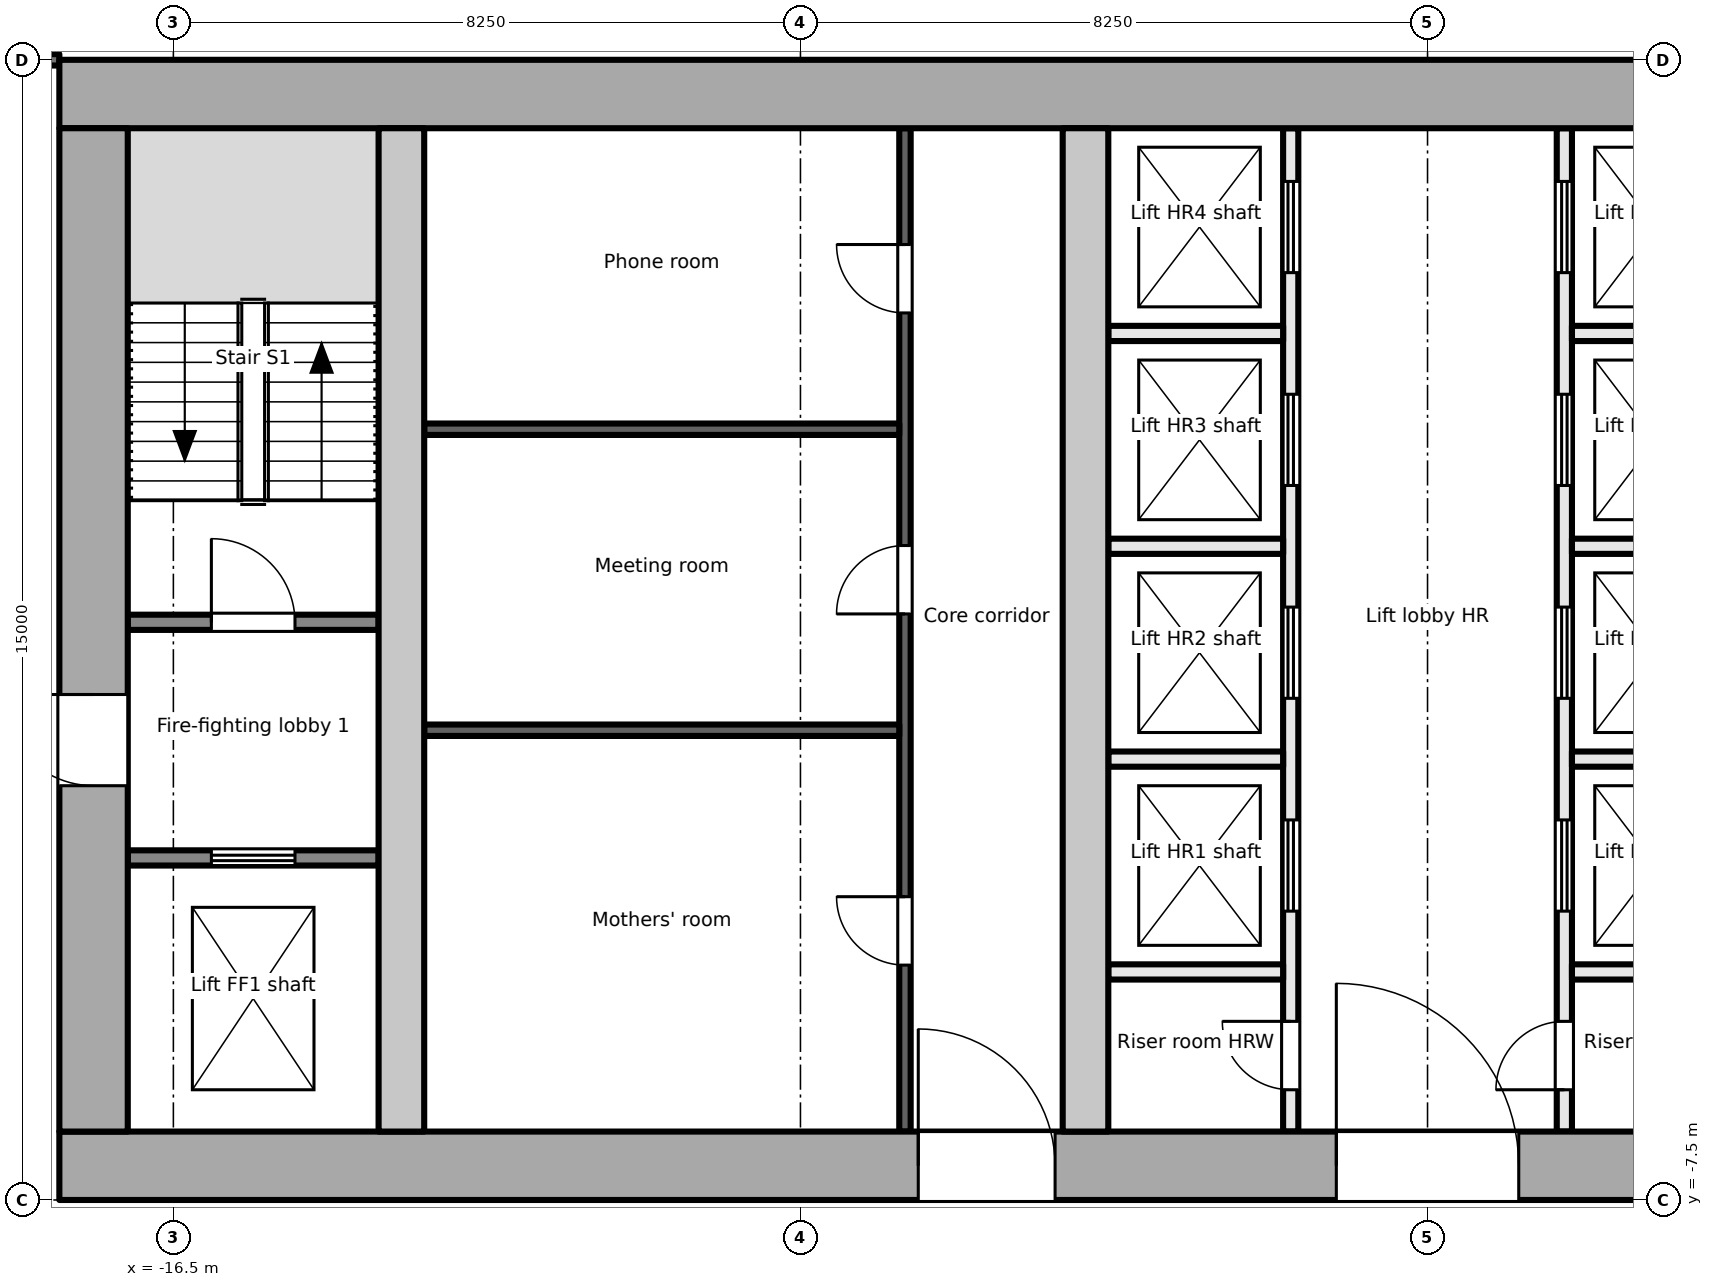
"""IFC4 building model, lengths in metres.
Left out: names, types, materials, properties, quantities, classifications, styles, units other than length and angle.
Written with IfcOpenShell. Run it as: python <this file> out.ifc"""

import sys

from ifc_helpers import new_model, si_unit, direction, frame, frame_2d, origin, place, context, subcontext, project, spatial, rectangle, extrude, element, fill, save


model = new_model("IFC4")
c1 = context("Model", 3, precision=1e-05, world=origin(), true_north=direction((0.0, 1.0)))
c2 = subcontext(c1, "Body", "Model", "MODEL_VIEW")
j1 = project(units=[si_unit("LENGTHUNIT", "METRE"), si_unit("PLANEANGLEUNIT", "RADIAN")], contexts=[c1])
p1 = place(None, origin())
s1 = spatial("IfcSite", under=j1, at=p1, CompositionType="ELEMENT")
p2 = place(p1, origin())
s2 = spatial("IfcBuilding", under=s1, at=p2, CompositionType="ELEMENT")
p3 = place(p2, frame((0.0, 0.0, 240.8)))
s3 = spatial("IfcBuildingStorey", under=s2, at=p3, CompositionType="ELEMENT", Elevation=240.8)
p4 = place(p3, frame((-18.0, -7.05, -0.2), z_axis=(0.0, 0.0, 1.0), x_axis=(1.0, 0.0, 0.0)))
e1 = element("IfcWall", 1, at=p4, inside=s3, PredefinedType="SHEAR", context=c2, shape_type="SweptSolid", body=[
    extrude(rectangle(XDim=36.0, YDim=0.9, at=frame_2d((18.0, 0.0))), origin(), (0.0, 0.0, 1.0), 3.9),
])
p5 = place(p4, frame((11.3, 0.0, 0.2)))
e2 = element("IfcOpeningElement", 2, at=p5, cuts=e1, PredefinedType="OPENING", context=c2, shape_type="SweptSolid", body=[
    extrude(rectangle(XDim=1.8, YDim=2.1, at=frame_2d((0.9, 1.05))), frame((0.0, 0.46, 0.0), z_axis=(0.0, -1.0, 0.0), x_axis=(1.0, 0.0, 0.0)), (0.0, 0.0, 1.0), 0.921),
])
p6 = place(p4, frame((16.8, 0.0, 0.2)))
e3 = element("IfcOpeningElement", 3, at=p6, cuts=e1, PredefinedType="OPENING", context=c2, shape_type="SweptSolid", body=[
    extrude(rectangle(XDim=2.4, YDim=2.1, at=frame_2d((1.2, 1.05))), frame((0.0, 0.46, 0.0), z_axis=(0.0, -1.0, 0.0), x_axis=(1.0, 0.0, 0.0)), (0.0, 0.0, 1.0), 0.921),
])
p7 = place(p4, frame((26.1, 0.0, 0.2)))
e4 = element("IfcOpeningElement", 4, at=p7, cuts=e1, PredefinedType="OPENING", context=c2, shape_type="SweptSolid", body=[
    extrude(rectangle(XDim=2.4, YDim=2.1, at=frame_2d((1.2, 1.05))), frame((0.0, 0.46, 0.0), z_axis=(0.0, -1.0, 0.0), x_axis=(1.0, 0.0, 0.0)), (0.0, 0.0, 1.0), 0.921),
])
p8 = place(p3, frame((-18.0, 7.05, -0.2), z_axis=(0.0, 0.0, 1.0), x_axis=(1.0, 0.0, 0.0)))
e5 = element("IfcWall", 5, at=p8, inside=s3, PredefinedType="SHEAR", context=c2, shape_type="SweptSolid", body=[
    extrude(rectangle(XDim=36.0, YDim=0.9, at=frame_2d((18.0, 0.0))), origin(), (0.0, 0.0, 1.0), 3.9),
])
p9 = place(p3, frame((-17.55, -6.6, -0.2), z_axis=(0.0, 0.0, 1.0), x_axis=(0.0, 1.0, 0.0)))
e6 = element("IfcWall", 6, at=p9, inside=s3, PredefinedType="SHEAR", context=c2, shape_type="SweptSolid", body=[
    extrude(rectangle(XDim=13.2, YDim=0.9, at=frame_2d((6.6, 0.0))), origin(), (0.0, 0.0, 1.0), 3.9),
])
p10 = place(p9, frame((4.55, 0.0, 0.2)))
e7 = element("IfcOpeningElement", 7, at=p10, cuts=e6, PredefinedType="OPENING", context=c2, shape_type="SweptSolid", body=[
    extrude(rectangle(XDim=1.2, YDim=2.1, at=frame_2d((0.6, 1.05))), frame((0.0, 0.46, 0.0), z_axis=(0.0, -1.0, 0.0), x_axis=(1.0, 0.0, 0.0)), (0.0, 0.0, 1.0), 0.921),
])
for number, where, z_axis, x_axis in (
    (8, (-13.5, -6.6, -0.2), (0.0, 0.0, 1.0), (0.0, 1.0, 0.0)),
    (9, (-4.5, -6.6, -0.2), (0.0, 0.0, 1.0), (0.0, 1.0, 0.0)),
):
    element("IfcWall", number, at=place(p3, frame(where, z_axis=z_axis, x_axis=x_axis)), inside=s3, PredefinedType="SHEAR", context=c2, shape_type="SweptSolid", body=[
        extrude(rectangle(XDim=13.2, YDim=0.6, at=frame_2d((6.6, 0.0))), origin(), (0.0, 0.0, 1.0), 3.9),
    ])
p11 = place(p3, frame((-17.1, -3.0, 0.0), z_axis=(0.0, 0.0, 1.0), x_axis=(1.0, 0.0, 0.0)))
e10 = element("IfcWall", 10, at=p11, inside=s3, PredefinedType="PARTITIONING", context=c2, shape_type="SweptSolid", body=[
    extrude(rectangle(XDim=3.3, YDim=0.2, at=frame_2d((1.65, 0.0))), origin(), (0.0, 0.0, 1.0), 3.7),
])
p12 = place(p11, frame((1.1, 0.0, 0.0)))
e11 = element("IfcOpeningElement", 11, at=p12, cuts=e10, PredefinedType="OPENING", context=c2, shape_type="SweptSolid", body=[
    extrude(rectangle(XDim=1.1, YDim=2.1, at=frame_2d((0.55, 1.05))), frame((0.0, 0.111, 0.0), z_axis=(0.0, -1.0, 0.0), x_axis=(1.0, 0.0, 0.0)), (0.0, 0.0, 1.0), 0.221),
])
p13 = place(p3, frame((-17.1, 0.1, 0.0), z_axis=(0.0, 0.0, 1.0), x_axis=(1.0, 0.0, 0.0)))
e12 = element("IfcWall", 12, at=p13, inside=s3, PredefinedType="PARTITIONING", context=c2, shape_type="SweptSolid", body=[
    extrude(rectangle(XDim=3.3, YDim=0.2, at=frame_2d((1.65, 0.0))), origin(), (0.0, 0.0, 1.0), 3.7),
])
p14 = place(p13, frame((1.1, 0.0, 0.0)))
e13 = element("IfcOpeningElement", 13, at=p14, cuts=e12, PredefinedType="OPENING", context=c2, shape_type="SweptSolid", body=[
    extrude(rectangle(XDim=1.1, YDim=2.1, at=frame_2d((0.55, 1.05))), frame((0.0, 0.111, 0.0), z_axis=(0.0, -1.0, 0.0), x_axis=(1.0, 0.0, 0.0)), (0.0, 0.0, 1.0), 0.221),
])
p15 = place(p3, frame((-6.875, -6.6, 0.0), z_axis=(0.0, 0.0, 1.0), x_axis=(0.0, 1.0, 0.0)))
e14 = element("IfcWall", 14, at=p15, inside=s3, PredefinedType="PARTITIONING", context=c2, shape_type="SweptSolid", body=[
    extrude(rectangle(XDim=13.2, YDim=0.15, at=frame_2d((6.6, 0.0))), origin(), (0.0, 0.0, 1.0), 3.7),
])
p16 = place(p15, frame((2.19, 0.0, 0.0)))
e15 = element("IfcOpeningElement", 15, at=p16, cuts=e14, PredefinedType="OPENING", context=c2, shape_type="SweptSolid", body=[
    extrude(rectangle(XDim=0.9, YDim=2.1, at=frame_2d((0.45, 1.05))), frame((0.0, 0.085, 0.0), z_axis=(0.0, -1.0, 0.0), x_axis=(1.0, 0.0, 0.0)), (0.0, 0.0, 1.0), 0.171),
])
p17 = place(p15, frame((6.81, 0.0, 0.0)))
e16 = element("IfcOpeningElement", 16, at=p17, cuts=e14, PredefinedType="OPENING", context=c2, shape_type="SweptSolid", body=[
    extrude(rectangle(XDim=0.9, YDim=2.1, at=frame_2d((0.45, 1.05))), frame((0.0, 0.085, 0.0), z_axis=(0.0, -1.0, 0.0), x_axis=(1.0, 0.0, 0.0)), (0.0, 0.0, 1.0), 0.171),
])
p18 = place(p15, frame((10.77, 0.0, 0.0)))
e17 = element("IfcOpeningElement", 17, at=p18, cuts=e14, PredefinedType="OPENING", context=c2, shape_type="SweptSolid", body=[
    extrude(rectangle(XDim=0.9, YDim=2.1, at=frame_2d((0.45, 1.05))), frame((0.0, 0.085, 0.0), z_axis=(0.0, -1.0, 0.0), x_axis=(1.0, 0.0, 0.0)), (0.0, 0.0, 1.0), 0.171),
])
for number, where, z_axis, x_axis in (
    (18, (-13.2, -1.32, 0.0), (0.0, 0.0, 1.0), (1.0, 0.0, 0.0)),
    (19, (-13.2, 2.64, 0.0), (0.0, 0.0, 1.0), (1.0, 0.0, 0.0)),
):
    element("IfcWall", number, at=place(p3, frame(where, z_axis=z_axis, x_axis=x_axis)), inside=s3, PredefinedType="PARTITIONING", context=c2, shape_type="SweptSolid", body=[
        extrude(rectangle(XDim=6.25, YDim=0.15, at=frame_2d((3.125, 0.0))), origin(), (0.0, 0.0, 1.0), 3.7),
    ])
p19 = place(p3, frame((-1.8, -6.6, 0.0), z_axis=(0.0, 0.0, 1.0), x_axis=(0.0, 1.0, 0.0)))
e20 = element("IfcWall", 20, at=p19, inside=s3, PredefinedType="PARTITIONING", context=c2, shape_type="SweptSolid", body=[
    extrude(rectangle(XDim=13.2, YDim=0.2, at=frame_2d((6.6, 0.0))), origin(), (0.0, 0.0, 1.0), 3.7),
])
p20 = place(p19, frame((0.55, 0.0, 0.0)))
e21 = element("IfcOpeningElement", 21, at=p20, cuts=e20, PredefinedType="OPENING", context=c2, shape_type="SweptSolid", body=[
    extrude(rectangle(XDim=0.9, YDim=2.1, at=frame_2d((0.45, 1.05))), frame((0.0, 0.111, 0.0), z_axis=(0.0, -1.0, 0.0), x_axis=(1.0, 0.0, 0.0)), (0.0, 0.0, 1.0), 0.221),
])
p21 = place(p19, frame((2.9, 0.0, 0.0)))
e22 = element("IfcOpeningElement", 22, at=p21, cuts=e20, PredefinedType="OPENING", context=c2, shape_type="SweptSolid", body=[
    extrude(rectangle(XDim=1.2, YDim=2.1, at=frame_2d((0.6, 1.05))), frame((0.0, 0.111, 0.0), z_axis=(0.0, -1.0, 0.0), x_axis=(1.0, 0.0, 0.0)), (0.0, 0.0, 1.0), 0.221),
])
p22 = place(p19, frame((5.7, 0.0, 0.0)))
e23 = element("IfcOpeningElement", 23, at=p22, cuts=e20, PredefinedType="OPENING", context=c2, shape_type="SweptSolid", body=[
    extrude(rectangle(XDim=1.2, YDim=2.1, at=frame_2d((0.6, 1.05))), frame((0.0, 0.111, 0.0), z_axis=(0.0, -1.0, 0.0), x_axis=(1.0, 0.0, 0.0)), (0.0, 0.0, 1.0), 0.221),
])
p23 = place(p19, frame((8.5, 0.0, 0.0)))
e24 = element("IfcOpeningElement", 24, at=p23, cuts=e20, PredefinedType="OPENING", context=c2, shape_type="SweptSolid", body=[
    extrude(rectangle(XDim=1.2, YDim=2.1, at=frame_2d((0.6, 1.05))), frame((0.0, 0.111, 0.0), z_axis=(0.0, -1.0, 0.0), x_axis=(1.0, 0.0, 0.0)), (0.0, 0.0, 1.0), 0.221),
])
p24 = place(p19, frame((11.3, 0.0, 0.0)))
e25 = element("IfcOpeningElement", 25, at=p24, cuts=e20, PredefinedType="OPENING", context=c2, shape_type="SweptSolid", body=[
    extrude(rectangle(XDim=1.2, YDim=2.1, at=frame_2d((0.6, 1.05))), frame((0.0, 0.111, 0.0), z_axis=(0.0, -1.0, 0.0), x_axis=(1.0, 0.0, 0.0)), (0.0, 0.0, 1.0), 0.221),
])
p25 = place(p3, frame((1.8, -6.6, 0.0), z_axis=(0.0, 0.0, 1.0), x_axis=(0.0, 1.0, 0.0)))
e26 = element("IfcWall", 26, at=p25, inside=s3, PredefinedType="PARTITIONING", context=c2, shape_type="SweptSolid", body=[
    extrude(rectangle(XDim=13.2, YDim=0.2, at=frame_2d((6.6, 0.0))), origin(), (0.0, 0.0, 1.0), 3.7),
])
p26 = place(p25, frame((0.55, 0.0, 0.0)))
e27 = element("IfcOpeningElement", 27, at=p26, cuts=e26, PredefinedType="OPENING", context=c2, shape_type="SweptSolid", body=[
    extrude(rectangle(XDim=0.9, YDim=2.1, at=frame_2d((0.45, 1.05))), frame((0.0, 0.111, 0.0), z_axis=(0.0, -1.0, 0.0), x_axis=(1.0, 0.0, 0.0)), (0.0, 0.0, 1.0), 0.221),
])
p27 = place(p25, frame((2.9, 0.0, 0.0)))
e28 = element("IfcOpeningElement", 28, at=p27, cuts=e26, PredefinedType="OPENING", context=c2, shape_type="SweptSolid", body=[
    extrude(rectangle(XDim=1.2, YDim=2.1, at=frame_2d((0.6, 1.05))), frame((0.0, 0.111, 0.0), z_axis=(0.0, -1.0, 0.0), x_axis=(1.0, 0.0, 0.0)), (0.0, 0.0, 1.0), 0.221),
])
p28 = place(p25, frame((5.7, 0.0, 0.0)))
e29 = element("IfcOpeningElement", 29, at=p28, cuts=e26, PredefinedType="OPENING", context=c2, shape_type="SweptSolid", body=[
    extrude(rectangle(XDim=1.2, YDim=2.1, at=frame_2d((0.6, 1.05))), frame((0.0, 0.111, 0.0), z_axis=(0.0, -1.0, 0.0), x_axis=(1.0, 0.0, 0.0)), (0.0, 0.0, 1.0), 0.221),
])
p29 = place(p25, frame((8.5, 0.0, 0.0)))
e30 = element("IfcOpeningElement", 30, at=p29, cuts=e26, PredefinedType="OPENING", context=c2, shape_type="SweptSolid", body=[
    extrude(rectangle(XDim=1.2, YDim=2.1, at=frame_2d((0.6, 1.05))), frame((0.0, 0.111, 0.0), z_axis=(0.0, -1.0, 0.0), x_axis=(1.0, 0.0, 0.0)), (0.0, 0.0, 1.0), 0.221),
])
p30 = place(p25, frame((11.3, 0.0, 0.0)))
e31 = element("IfcOpeningElement", 31, at=p30, cuts=e26, PredefinedType="OPENING", context=c2, shape_type="SweptSolid", body=[
    extrude(rectangle(XDim=1.2, YDim=2.1, at=frame_2d((0.6, 1.05))), frame((0.0, 0.111, 0.0), z_axis=(0.0, -1.0, 0.0), x_axis=(1.0, 0.0, 0.0)), (0.0, 0.0, 1.0), 0.221),
])
for number, where, z_axis, x_axis in (
    (32, (-4.2, -1.7, 0.0), (0.0, 0.0, 1.0), (1.0, 0.0, 0.0)),
    (33, (-4.2, 1.1, 0.0), (0.0, 0.0, 1.0), (1.0, 0.0, 0.0)),
    (34, (-4.2, 3.9, 0.0), (0.0, 0.0, 1.0), (1.0, 0.0, 0.0)),
    (35, (-4.2, -4.5, 0.0), (0.0, 0.0, 1.0), (1.0, 0.0, 0.0)),
    (36, (1.9, -1.7, 0.0), (0.0, 0.0, 1.0), (1.0, 0.0, 0.0)),
    (37, (1.9, 1.1, 0.0), (0.0, 0.0, 1.0), (1.0, 0.0, 0.0)),
    (38, (1.9, 3.9, 0.0), (0.0, 0.0, 1.0), (1.0, 0.0, 0.0)),
    (39, (1.9, -4.5, 0.0), (0.0, 0.0, 1.0), (1.0, 0.0, 0.0)),
):
    element("IfcWall", number, at=place(p3, frame(where, z_axis=z_axis, x_axis=x_axis)), inside=s3, PredefinedType="PARTITIONING", context=c2, shape_type="SweptSolid", body=[
        extrude(rectangle(XDim=2.3, YDim=0.2, at=frame_2d((1.15, 0.0))), origin(), (0.0, 0.0, 1.0), 3.7),
    ])
p31 = place(p3, frame((-20.431, 7.5, 0.0), z_axis=(0.0, 0.0, 1.0), x_axis=(1.0, 0.0, 0.0)))
e40 = element("IfcWall", 40, at=p31, inside=s3, PredefinedType="PARTITIONING", context=c2, shape_type="SweptSolid", body=[
    extrude(rectangle(XDim=2.431, YDim=0.15, at=frame_2d((1.215, 0.0))), origin(), (0.0, 0.0, 1.0), 3.7),
])
p32 = place(p12, origin())
e41 = element("IfcDoor", 41, at=p32, inside=s3, OperationType="DOUBLE_DOOR_SLIDING", PredefinedType="DOOR", context=c2, shape_type="SweptSolid", body=[
    extrude(rectangle(XDim=1.1, YDim=2.1, at=frame_2d((0.55, 1.05))), frame((0.0, 0.025, 0.0), z_axis=(0.0, -1.0, 0.0), x_axis=(1.0, 0.0, 0.0)), (0.0, 0.0, 1.0), 0.05),
])
fill(e11, e41)
p33 = place(p10, origin())
e42 = element("IfcDoor", 42, at=p33, inside=s3, OperationType="SINGLE_SWING_RIGHT", PredefinedType="DOOR", context=c2, shape_type="SweptSolid", body=[
    extrude(rectangle(XDim=1.2, YDim=2.1, at=frame_2d((0.6, 1.05))), frame((0.0, 0.025, 0.0), z_axis=(0.0, -1.0, 0.0), x_axis=(1.0, 0.0, 0.0)), (0.0, 0.0, 1.0), 0.05),
])
fill(e7, e42)
p34 = place(p14, origin())
e43 = element("IfcDoor", 43, at=p34, inside=s3, OperationType="SINGLE_SWING_LEFT", PredefinedType="DOOR", context=c2, shape_type="SweptSolid", body=[
    extrude(rectangle(XDim=1.1, YDim=2.1, at=frame_2d((0.55, 1.05))), frame((0.0, 0.025, 0.0), z_axis=(0.0, -1.0, 0.0), x_axis=(1.0, 0.0, 0.0)), (0.0, 0.0, 1.0), 0.05),
])
fill(e13, e43)
p35 = place(p16, origin())
e44 = element("IfcDoor", 44, at=p35, inside=s3, OperationType="SINGLE_SWING_RIGHT", PredefinedType="DOOR", context=c2, shape_type="SweptSolid", body=[
    extrude(rectangle(XDim=0.9, YDim=2.1, at=frame_2d((0.45, 1.05))), frame((0.0, 0.025, 0.0), z_axis=(0.0, -1.0, 0.0), x_axis=(1.0, 0.0, 0.0)), (0.0, 0.0, 1.0), 0.05),
])
fill(e15, e44)
p36 = place(p17, origin())
e45 = element("IfcDoor", 45, at=p36, inside=s3, OperationType="SINGLE_SWING_LEFT", PredefinedType="DOOR", context=c2, shape_type="SweptSolid", body=[
    extrude(rectangle(XDim=0.9, YDim=2.1, at=frame_2d((0.45, 1.05))), frame((0.0, 0.025, 0.0), z_axis=(0.0, -1.0, 0.0), x_axis=(1.0, 0.0, 0.0)), (0.0, 0.0, 1.0), 0.05),
])
fill(e16, e45)
p37 = place(p18, origin())
e46 = element("IfcDoor", 46, at=p37, inside=s3, OperationType="SINGLE_SWING_RIGHT", PredefinedType="DOOR", context=c2, shape_type="SweptSolid", body=[
    extrude(rectangle(XDim=0.9, YDim=2.1, at=frame_2d((0.45, 1.05))), frame((0.0, 0.025, 0.0), z_axis=(0.0, -1.0, 0.0), x_axis=(1.0, 0.0, 0.0)), (0.0, 0.0, 1.0), 0.05),
])
fill(e17, e46)
p38 = place(p5, origin())
e47 = element("IfcDoor", 47, at=p38, inside=s3, OperationType="SINGLE_SWING_LEFT", PredefinedType="DOOR", context=c2, shape_type="SweptSolid", body=[
    extrude(rectangle(XDim=1.8, YDim=2.1, at=frame_2d((0.9, 1.05))), frame((0.0, 0.025, 0.0), z_axis=(0.0, -1.0, 0.0), x_axis=(1.0, 0.0, 0.0)), (0.0, 0.0, 1.0), 0.05),
])
fill(e2, e47)
p39 = place(p20, origin())
e48 = element("IfcDoor", 48, at=p39, inside=s3, OperationType="SINGLE_SWING_RIGHT", PredefinedType="DOOR", context=c2, shape_type="SweptSolid", body=[
    extrude(rectangle(XDim=0.9, YDim=2.1, at=frame_2d((0.45, 1.05))), frame((0.0, 0.025, 0.0), z_axis=(0.0, -1.0, 0.0), x_axis=(1.0, 0.0, 0.0)), (0.0, 0.0, 1.0), 0.05),
])
fill(e21, e48)
p40 = place(p21, origin())
e49 = element("IfcDoor", 49, at=p40, inside=s3, OperationType="DOUBLE_DOOR_SLIDING", PredefinedType="DOOR", context=c2, shape_type="SweptSolid", body=[
    extrude(rectangle(XDim=1.2, YDim=2.1, at=frame_2d((0.6, 1.05))), frame((0.0, 0.025, 0.0), z_axis=(0.0, -1.0, 0.0), x_axis=(1.0, 0.0, 0.0)), (0.0, 0.0, 1.0), 0.05),
])
fill(e22, e49)
p41 = place(p22, origin())
e50 = element("IfcDoor", 50, at=p41, inside=s3, OperationType="DOUBLE_DOOR_SLIDING", PredefinedType="DOOR", context=c2, shape_type="SweptSolid", body=[
    extrude(rectangle(XDim=1.2, YDim=2.1, at=frame_2d((0.6, 1.05))), frame((0.0, 0.025, 0.0), z_axis=(0.0, -1.0, 0.0), x_axis=(1.0, 0.0, 0.0)), (0.0, 0.0, 1.0), 0.05),
])
fill(e23, e50)
p42 = place(p23, origin())
e51 = element("IfcDoor", 51, at=p42, inside=s3, OperationType="DOUBLE_DOOR_SLIDING", PredefinedType="DOOR", context=c2, shape_type="SweptSolid", body=[
    extrude(rectangle(XDim=1.2, YDim=2.1, at=frame_2d((0.6, 1.05))), frame((0.0, 0.025, 0.0), z_axis=(0.0, -1.0, 0.0), x_axis=(1.0, 0.0, 0.0)), (0.0, 0.0, 1.0), 0.05),
])
fill(e24, e51)
p43 = place(p24, origin())
e52 = element("IfcDoor", 52, at=p43, inside=s3, OperationType="DOUBLE_DOOR_SLIDING", PredefinedType="DOOR", context=c2, shape_type="SweptSolid", body=[
    extrude(rectangle(XDim=1.2, YDim=2.1, at=frame_2d((0.6, 1.05))), frame((0.0, 0.025, 0.0), z_axis=(0.0, -1.0, 0.0), x_axis=(1.0, 0.0, 0.0)), (0.0, 0.0, 1.0), 0.05),
])
fill(e25, e52)
p44 = place(p26, origin())
e53 = element("IfcDoor", 53, at=p44, inside=s3, OperationType="SINGLE_SWING_LEFT", PredefinedType="DOOR", context=c2, shape_type="SweptSolid", body=[
    extrude(rectangle(XDim=0.9, YDim=2.1, at=frame_2d((0.45, 1.05))), frame((0.0, 0.025, 0.0), z_axis=(0.0, -1.0, 0.0), x_axis=(1.0, 0.0, 0.0)), (0.0, 0.0, 1.0), 0.05),
])
fill(e27, e53)
p45 = place(p27, origin())
e54 = element("IfcDoor", 54, at=p45, inside=s3, OperationType="DOUBLE_DOOR_SLIDING", PredefinedType="DOOR", context=c2, shape_type="SweptSolid", body=[
    extrude(rectangle(XDim=1.2, YDim=2.1, at=frame_2d((0.6, 1.05))), frame((0.0, 0.025, 0.0), z_axis=(0.0, -1.0, 0.0), x_axis=(1.0, 0.0, 0.0)), (0.0, 0.0, 1.0), 0.05),
])
fill(e28, e54)
p46 = place(p28, origin())
e55 = element("IfcDoor", 55, at=p46, inside=s3, OperationType="DOUBLE_DOOR_SLIDING", PredefinedType="DOOR", context=c2, shape_type="SweptSolid", body=[
    extrude(rectangle(XDim=1.2, YDim=2.1, at=frame_2d((0.6, 1.05))), frame((0.0, 0.025, 0.0), z_axis=(0.0, -1.0, 0.0), x_axis=(1.0, 0.0, 0.0)), (0.0, 0.0, 1.0), 0.05),
])
fill(e29, e55)
p47 = place(p29, origin())
e56 = element("IfcDoor", 56, at=p47, inside=s3, OperationType="DOUBLE_DOOR_SLIDING", PredefinedType="DOOR", context=c2, shape_type="SweptSolid", body=[
    extrude(rectangle(XDim=1.2, YDim=2.1, at=frame_2d((0.6, 1.05))), frame((0.0, 0.025, 0.0), z_axis=(0.0, -1.0, 0.0), x_axis=(1.0, 0.0, 0.0)), (0.0, 0.0, 1.0), 0.05),
])
fill(e30, e56)
p48 = place(p30, origin())
e57 = element("IfcDoor", 57, at=p48, inside=s3, OperationType="DOUBLE_DOOR_SLIDING", PredefinedType="DOOR", context=c2, shape_type="SweptSolid", body=[
    extrude(rectangle(XDim=1.2, YDim=2.1, at=frame_2d((0.6, 1.05))), frame((0.0, 0.025, 0.0), z_axis=(0.0, -1.0, 0.0), x_axis=(1.0, 0.0, 0.0)), (0.0, 0.0, 1.0), 0.05),
])
fill(e31, e57)
p49 = place(p6, origin())
e58 = element("IfcDoor", 58, at=p49, inside=s3, OperationType="DOUBLE_DOOR_DOUBLE_SWING", PredefinedType="DOOR", context=c2, shape_type="SweptSolid", body=[
    extrude(rectangle(XDim=2.4, YDim=2.1, at=frame_2d((1.2, 1.05))), frame((0.0, 0.025, 0.0), z_axis=(0.0, -1.0, 0.0), x_axis=(1.0, 0.0, 0.0)), (0.0, 0.0, 1.0), 0.05),
])
fill(e3, e58)
save(model, sys.argv[1])
